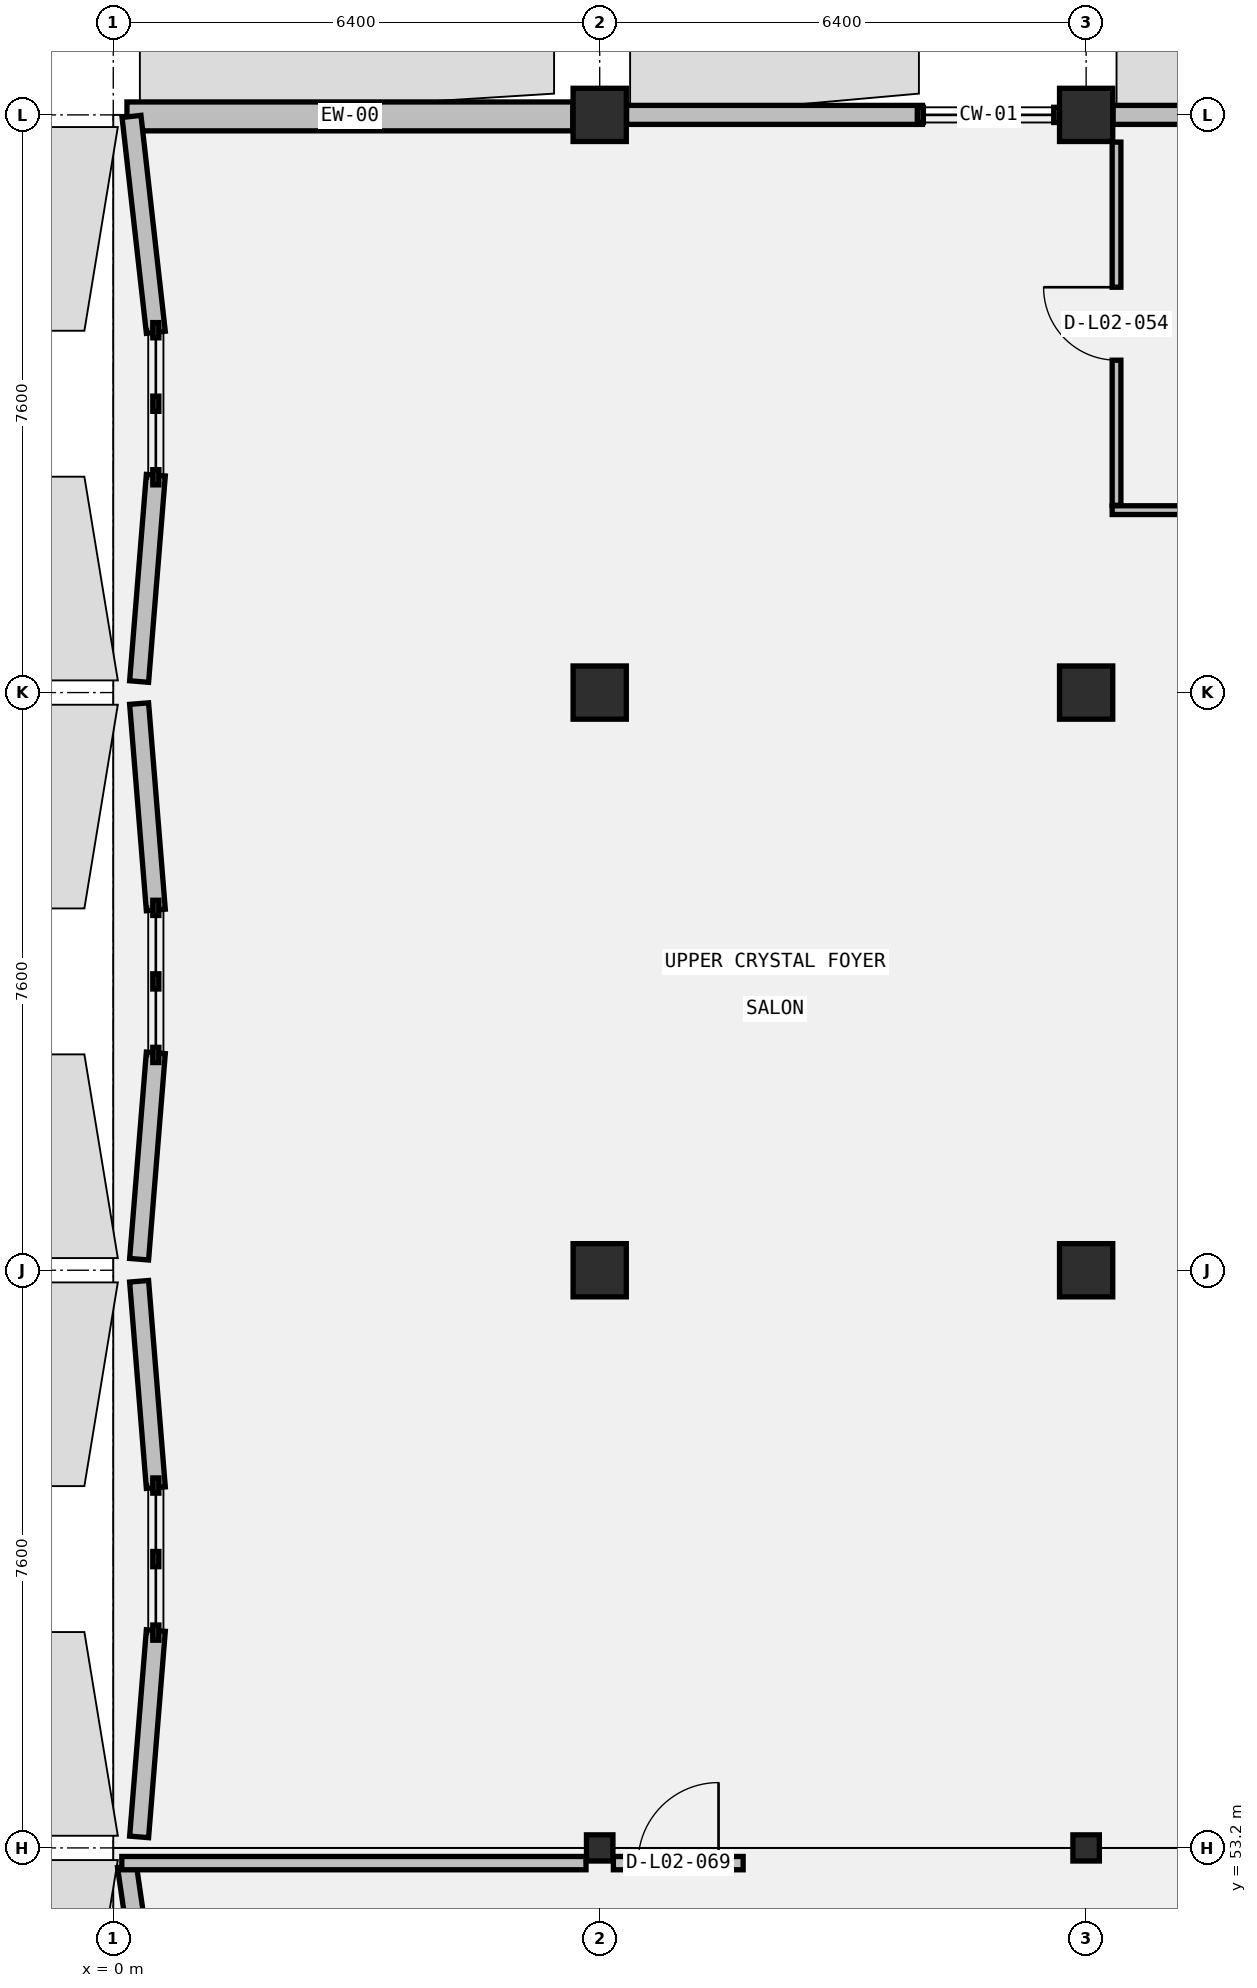
"""IFC4 building model, lengths in metres.
Left out: names, types, materials, properties, quantities, classifications, styles, units other than length and angle.
Written with IfcOpenShell. Run it as: python <this file> out.ifc"""

import sys

from ifc_helpers import new_model, si_unit, direction, frame, frame_2d, origin, origin_2d, place, context, subcontext, project, spatial, rectangle, circle, i_section, extrude, element, fill, save


model = new_model("IFC4")
c1 = context("Model", 3, precision=1e-05, world=origin(), true_north=direction((0.0, 1.0)))
c2 = subcontext(c1, "Body", "Model", "MODEL_VIEW")
j1 = project(units=[si_unit("LENGTHUNIT", "METRE"), si_unit("PLANEANGLEUNIT", "RADIAN")], contexts=[c1])
p1 = place(None, origin())
s1 = spatial("IfcSite", under=j1, at=p1, CompositionType="ELEMENT")
p2 = place(p1, origin())
s2 = spatial("IfcBuilding", under=s1, at=p2, CompositionType="ELEMENT")
p3 = place(p2, frame((0.0, 0.0, 10.0)))
s3 = spatial("IfcBuildingStorey", under=s2, at=p3, CompositionType="ELEMENT", Elevation=10.0)
p4 = place(p3, frame((6.4, 53.2, 0.0), z_axis=(0.0, 0.0, 1.0), x_axis=(1.0, 0.0, 0.0)))
e1 = element("IfcColumn", 1, at=p4, inside=s3, PredefinedType="COLUMN", context=c2, shape_type="SweptSolid", body=[
    extrude(i_section(OverallWidth=0.348, OverallDepth=0.344, WebThickness=0.01, FlangeThickness=0.016, FilletRadius=0.018, at=origin_2d()), origin(), (0.0, 0.0, 1.0), 4.6),
])
for number, where, z_axis, x_axis in (
    (2, (6.4, 60.8, 0.0), (0.0, 0.0, 1.0), (1.0, 0.0, 0.0)),
    (3, (6.4, 68.4, 0.0), (0.0, 0.0, 1.0), (1.0, 0.0, 0.0)),
    (4, (6.4, 76.0, 0.0), (0.0, 0.0, 1.0), (1.0, 0.0, 0.0)),
):
    element("IfcColumn", number, at=place(p3, frame(where, z_axis=z_axis, x_axis=x_axis)), inside=s3, PredefinedType="COLUMN", context=c2, shape_type="SweptSolid", body=[
        extrude(circle(Radius=0.35, at=origin_2d()), origin(), (0.0, 0.0, 1.0), 4.6),
    ])
p5 = place(p3, frame((12.8, 53.2, 0.0), z_axis=(0.0, 0.0, 1.0), x_axis=(1.0, 0.0, 0.0)))
e5 = element("IfcColumn", 5, at=p5, inside=s3, PredefinedType="COLUMN", context=c2, shape_type="SweptSolid", body=[
    extrude(i_section(OverallWidth=0.348, OverallDepth=0.344, WebThickness=0.01, FlangeThickness=0.016, FilletRadius=0.018, at=origin_2d()), origin(), (0.0, 0.0, 1.0), 4.6),
])
for number, where, z_axis, x_axis in (
    (6, (12.8, 60.8, 0.0), (0.0, 0.0, 1.0), (1.0, 0.0, 0.0)),
    (7, (12.8, 68.4, 0.0), (0.0, 0.0, 1.0), (1.0, 0.0, 0.0)),
    (8, (12.8, 76.0, 0.0), (0.0, 0.0, 1.0), (1.0, 0.0, 0.0)),
):
    element("IfcColumn", number, at=place(p3, frame(where, z_axis=z_axis, x_axis=x_axis)), inside=s3, PredefinedType="COLUMN", context=c2, shape_type="SweptSolid", body=[
        extrude(circle(Radius=0.35, at=origin_2d()), origin(), (0.0, 0.0, 1.0), 4.6),
    ])
p6 = place(p3, frame((0.18, 75.98, 0.0), z_axis=(0.0, 0.0, 1.0), x_axis=(1.0, 0.0, 0.0)))
e9 = element("IfcWall", 9, at=p6, inside=s3, PredefinedType="STANDARD", context=c2, shape_type="SweptSolid", body=[
    extrude(rectangle(XDim=5.866, YDim=0.38, at=frame_2d((2.933, 0.0))), origin(), (0.0, 0.0, 1.0), 3.538),
])
p7 = place(p3, frame((6.754, 76.0, 0.0), z_axis=(0.0, 0.0, 1.0), x_axis=(1.0, 0.0, 0.0)))
e10 = element("IfcWall", 10, at=p7, inside=s3, PredefinedType="STANDARD", context=c2, shape_type="SweptSolid", body=[
    extrude(rectangle(XDim=3.892, YDim=0.25, at=frame_2d((1.946, 0.0))), origin(), (0.0, 0.0, 1.0), 3.538),
])
p8 = place(p3, frame((13.154, 76.0, 0.0), z_axis=(0.0, 0.0, 1.0), x_axis=(1.0, 0.0, 0.0)))
e11 = element("IfcWall", 11, at=p8, inside=s3, PredefinedType="STANDARD", context=c2, shape_type="SweptSolid", body=[
    extrude(rectangle(XDim=3.892, YDim=0.25, at=frame_2d((1.946, 0.0))), origin(), (0.0, 0.0, 1.0), 3.538),
])
p9 = place(p3, frame((0.56, 50.34, 0.0), z_axis=(0.0, 0.0, 1.0), x_axis=(-0.14359008471, 0.989637250498, 0.0)))
e12 = element("IfcWall", 12, at=p9, inside=s3, PredefinedType="STANDARD", context=c2, shape_type="SweptSolid", body=[
    extrude(rectangle(XDim=2.647, YDim=0.25, at=frame_2d((1.324, 0.0))), origin(), (0.0, 0.0, 1.0), 3.538),
])
for number, where, z_axis, x_axis in (
    (13, (0.34, 53.345, 0.0), (0.0, 0.0, 1.0), (0.081, 0.997, 0.0)),
    (14, (0.56, 57.94, 0.0), (0.0, 0.0, 1.0), (-0.081, 0.997, 0.0)),
):
    element("IfcWall", number, at=place(p3, frame(where, z_axis=z_axis, x_axis=x_axis)), inside=s3, PredefinedType="STANDARD", context=c2, shape_type="SweptSolid", body=[
        extrude(rectangle(XDim=2.724, YDim=0.25, at=frame_2d((1.362, 0.0))), origin(), (0.0, 0.0, 1.0), 3.538),
    ])
for number, where, z_axis, x_axis in (
    (15, (0.34, 60.945, 0.0), (0.0, 0.0, 1.0), (0.081, 0.997, 0.0)),
    (16, (0.56, 65.54, 0.0), (0.0, 0.0, 1.0), (-0.081, 0.997, 0.0)),
):
    element("IfcWall", number, at=place(p3, frame(where, z_axis=z_axis, x_axis=x_axis)), inside=s3, PredefinedType="STANDARD", context=c2, shape_type="SweptSolid", body=[
        extrude(rectangle(XDim=2.724, YDim=0.25, at=frame_2d((1.362, 0.0))), origin(), (0.0, 0.0, 1.0), 3.538),
    ])
p10 = place(p3, frame((0.34, 68.545, 0.0), z_axis=(0.0, 0.0, 1.0), x_axis=(0.080753299301, 0.996734119338, 0.0)))
e17 = element("IfcWall", 17, at=p10, inside=s3, PredefinedType="STANDARD", context=c2, shape_type="SweptSolid", body=[
    extrude(rectangle(XDim=2.724, YDim=0.25, at=frame_2d((1.362, 0.0))), origin(), (0.0, 0.0, 1.0), 3.538),
])
p11 = place(p3, frame((0.56, 73.14, 0.0), z_axis=(0.0, 0.0, 1.0), x_axis=(-0.111987730746, 0.993709589449, 0.0)))
e18 = element("IfcWall", 18, at=p11, inside=s3, PredefinedType="STANDARD", context=c2, shape_type="SweptSolid", body=[
    extrude(rectangle(XDim=2.858, YDim=0.25, at=frame_2d((1.429, 0.0))), origin(), (0.0, 0.0, 1.0), 3.538),
])
p12 = place(p3, frame((13.143, 70.8, 0.0), z_axis=(0.0, 0.0, 1.0), x_axis=(1.0, 0.0, 0.0)))
e19 = element("IfcWall", 19, at=p12, inside=s3, PredefinedType="PARTITIONING", context=c2, shape_type="SweptSolid", body=[
    extrude(rectangle(XDim=5.715, YDim=0.115, at=frame_2d((2.857, 0.0))), origin(), (0.0, 0.0, 1.0), 3.938),
])
p13 = place(p3, frame((13.2, 70.864, 0.0), z_axis=(0.0, 0.0, 1.0), x_axis=(0.0, 1.0, 0.0)))
e20 = element("IfcWall", 20, at=p13, inside=s3, PredefinedType="PARTITIONING", context=c2, shape_type="SweptSolid", body=[
    extrude(rectangle(XDim=4.779, YDim=0.115, at=frame_2d((2.389, 0.0))), origin(), (0.0, 0.0, 1.0), 4.36),
])
p14 = place(p13, frame((1.909, 0.0, 0.0)))
e21 = element("IfcOpeningElement", 21, at=p14, cuts=e20, PredefinedType="OPENING", context=c2, shape_type="SweptSolid", body=[
    extrude(rectangle(XDim=0.96, YDim=2.08, at=frame_2d((0.48, 1.04))), frame((0.0, 0.067, 0.0), z_axis=(0.0, -1.0, 0.0), x_axis=(1.0, 0.0, 0.0)), (0.0, 0.0, 1.0), 0.135),
])
p15 = place(p3, frame((6.58, 53.0, 0.0), z_axis=(0.0, 0.0, 1.0), x_axis=(1.0, 0.0, 0.0)))
e22 = element("IfcWall", 22, at=p15, inside=s3, PredefinedType="PARTITIONING", context=c2, shape_type="SweptSolid", body=[
    extrude(rectangle(XDim=1.708, YDim=0.175, at=frame_2d((0.854, 0.0))), origin(), (0.0, 0.0, 1.0), 3.538),
])
p16 = place(p15, frame((0.324, 0.0, 0.0)))
e23 = element("IfcOpeningElement", 23, at=p16, cuts=e22, PredefinedType="OPENING", context=c2, shape_type="SweptSolid", body=[
    extrude(rectangle(XDim=1.06, YDim=2.15, at=frame_2d((0.53, 1.075))), frame((0.0, 0.097, 0.0), z_axis=(0.0, -1.0, 0.0), x_axis=(1.0, 0.0, 0.0)), (0.0, 0.0, 1.0), 0.195),
])
p17 = place(p3, frame((0.113, 53.0, 0.0), z_axis=(0.0, 0.0, 1.0), x_axis=(1.0, 0.0, 0.0)))
e24 = element("IfcWall", 24, at=p17, inside=s3, PredefinedType="PARTITIONING", context=c2, shape_type="SweptSolid", body=[
    extrude(rectangle(XDim=6.107, YDim=0.175, at=frame_2d((3.054, 0.0))), origin(), (0.0, 0.0, 1.0), 3.538),
])
p18 = place(p14, origin())
e25 = element("IfcDoor", 25, at=p18, inside=s3, OperationType="SINGLE_SWING_RIGHT", PredefinedType="DOOR", context=c2, shape_type="SweptSolid", body=[
    extrude(rectangle(XDim=0.96, YDim=2.08, at=frame_2d((0.48, 1.04))), frame((0.0, 0.025, 0.0), z_axis=(0.0, -1.0, 0.0), x_axis=(1.0, 0.0, 0.0)), (0.0, 0.0, 1.0), 0.05),
])
fill(e21, e25)
p19 = place(p16, origin())
e26 = element("IfcDoor", 26, at=p19, inside=s3, OperationType="SINGLE_SWING_RIGHT", PredefinedType="DOOR", context=c2, shape_type="SweptSolid", body=[
    extrude(rectangle(XDim=1.06, YDim=2.15, at=frame_2d((0.53, 1.075))), frame((0.0, 0.025, 0.0), z_axis=(0.0, -1.0, 0.0), x_axis=(1.0, 0.0, 0.0)), (0.0, 0.0, 1.0), 0.05),
])
fill(e23, e26)
save(model, sys.argv[1])
